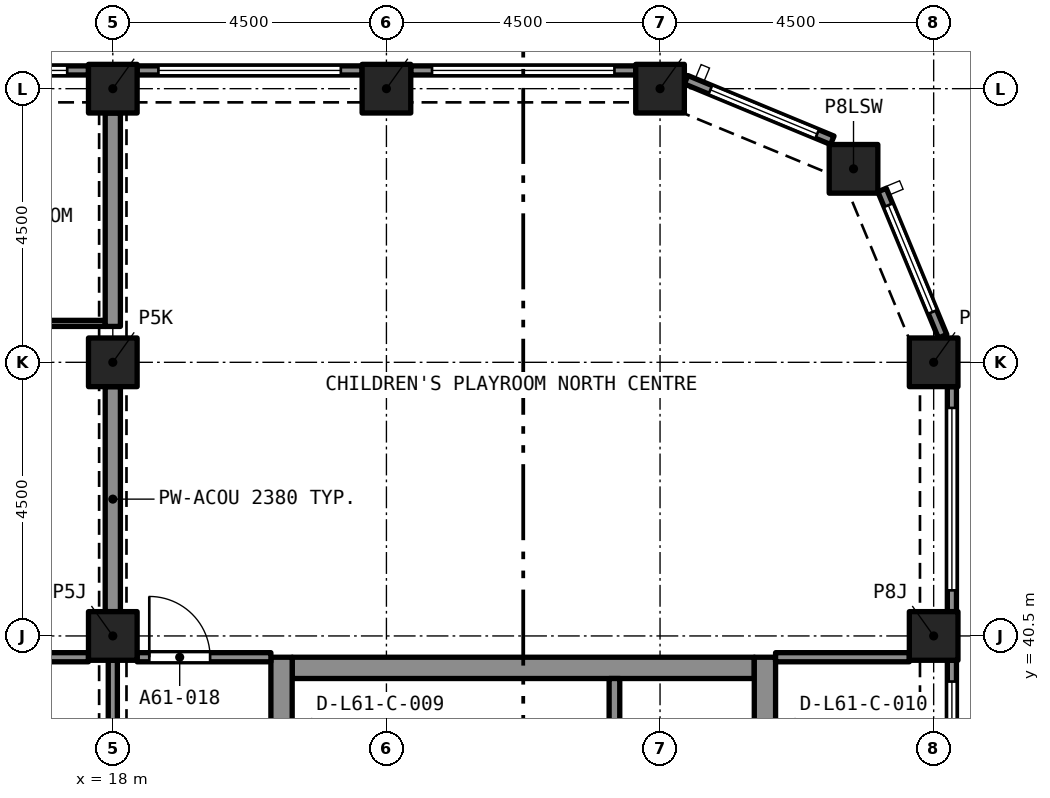
"""IFC4 building model, lengths in metres.
Left out: names, types, materials, properties, quantities, classifications, styles, units other than length and angle.
Written with IfcOpenShell. Run it as: python <this file> out.ifc"""

import sys

from ifc_helpers import new_model, si_unit, direction, frame, frame_2d, origin, origin_2d, place, context, subcontext, project, spatial, rectangle, extrude, element, fill, save


model = new_model("IFC4")
c1 = context("Model", 3, precision=1e-05, world=origin(), true_north=direction((0.0, 1.0)))
c2 = subcontext(c1, "Body", "Model", "MODEL_VIEW")
j1 = project(units=[si_unit("LENGTHUNIT", "METRE"), si_unit("PLANEANGLEUNIT", "RADIAN")], contexts=[c1])
p1 = place(None, origin())
s1 = spatial("IfcSite", under=j1, at=p1, CompositionType="ELEMENT")
p2 = place(p1, origin())
s2 = spatial("IfcBuilding", under=s1, at=p2, CompositionType="ELEMENT")
p3 = place(p2, frame((0.0, 0.0, 219.695)))
s3 = spatial("IfcBuildingStorey", under=s2, at=p3, CompositionType="ELEMENT", Elevation=219.695)
for number, where, z_axis, x_axis in (
    (1, (18.0, 40.5, 0.0), (0.0, 0.0, 1.0), (1.0, 0.0, 0.0)),
    (2, (31.5, 40.5, 0.0), (0.0, 0.0, 1.0), (1.0, 0.0, 0.0)),
    (3, (18.0, 45.0, 0.0), (0.0, 0.0, 1.0), (1.0, 0.0, 0.0)),
    (4, (31.5, 45.0, 0.0), (0.0, 0.0, 1.0), (1.0, 0.0, 0.0)),
    (5, (30.182, 48.182, 0.0), (0.0, 0.0, 1.0), (1.0, 0.0, 0.0)),
    (6, (18.0, 49.5, 0.0), (0.0, 0.0, 1.0), (1.0, 0.0, 0.0)),
    (7, (22.5, 49.5, 0.0), (0.0, 0.0, 1.0), (1.0, 0.0, 0.0)),
    (8, (27.0, 49.5, 0.0), (0.0, 0.0, 1.0), (1.0, 0.0, 0.0)),
):
    element("IfcColumn", number, at=place(p3, frame(where, z_axis=z_axis, x_axis=x_axis)), inside=s3, PredefinedType="COLUMN", context=c2, shape_type="SweptSolid", body=[
        extrude(rectangle(XDim=0.8, YDim=0.8, at=origin_2d()), origin(), (0.0, 0.0, 1.0), 3.2),
    ])
p4 = place(p3, frame((20.95, 39.975, 0.0), z_axis=(0.0, 0.0, 1.0), x_axis=(1.0, 0.0, 0.0)))
e9 = element("IfcWall", 9, at=p4, inside=s3, PredefinedType="SOLIDWALL", context=c2, shape_type="SweptSolid", body=[
    extrude(rectangle(XDim=7.6, YDim=0.35, at=frame_2d((3.8, 0.0))), origin(), (0.0, 0.0, 1.0), 3.2),
])
p5 = place(p3, frame((20.775, 27.35, 0.0), z_axis=(0.0, 0.0, 1.0), x_axis=(0.0, 1.0, 0.0)))
e10 = element("IfcWall", 10, at=p5, inside=s3, PredefinedType="SOLIDWALL", context=c2, shape_type="SweptSolid", body=[
    extrude(rectangle(XDim=12.8, YDim=0.35, at=frame_2d((6.4, 0.0))), origin(), (0.0, 0.0, 1.0), 3.2),
])
p6 = place(p5, frame((8.6, 0.0, 0.0)))
e11 = element("IfcOpeningElement", 11, at=p6, cuts=e10, PredefinedType="OPENING", context=c2, shape_type="SweptSolid", body=[
    extrude(rectangle(XDim=1.2, YDim=2.1, at=frame_2d((0.6, 1.05))), frame((0.0, 0.185, 0.0), z_axis=(0.0, -1.0, 0.0), x_axis=(1.0, 0.0, 0.0)), (0.0, 0.0, 1.0), 0.37),
])
p7 = place(p3, frame((28.725, 27.35, 0.0), z_axis=(0.0, 0.0, 1.0), x_axis=(0.0, 1.0, 0.0)))
e12 = element("IfcWall", 12, at=p7, inside=s3, PredefinedType="SOLIDWALL", context=c2, shape_type="SweptSolid", body=[
    extrude(rectangle(XDim=12.8, YDim=0.35, at=frame_2d((6.4, 0.0))), origin(), (0.0, 0.0, 1.0), 3.2),
])
p8 = place(p7, frame((8.6, 0.0, 0.0)))
e13 = element("IfcOpeningElement", 13, at=p8, cuts=e12, PredefinedType="OPENING", context=c2, shape_type="SweptSolid", body=[
    extrude(rectangle(XDim=1.2, YDim=2.1, at=frame_2d((0.6, 1.05))), frame((0.0, 0.185, 0.0), z_axis=(0.0, -1.0, 0.0), x_axis=(1.0, 0.0, 0.0)), (0.0, 0.0, 1.0), 0.37),
])
p9 = place(p3, frame((31.8, 40.1, 0.0), z_axis=(0.0, 0.0, 1.0), x_axis=(0.0, -1.0, 0.0)))
e14 = element("IfcWall", 14, at=p9, inside=s3, PredefinedType="SOLIDWALL", context=c2, shape_type="SweptSolid", body=[
    extrude(rectangle(XDim=3.7, YDim=0.15, at=frame_2d((1.85, 0.0))), origin(), (0.0, 0.0, 1.0), 3.2),
])
p10 = place(p9, frame((0.35, 0.0, 0.45)))
e15 = element("IfcOpeningElement", 15, at=p10, cuts=e14, PredefinedType="OPENING", context=c2, shape_type="SweptSolid", body=[
    extrude(rectangle(XDim=3.0, YDim=1.95, at=frame_2d((1.5, 0.975))), frame((0.0, 0.085, 0.0), z_axis=(0.0, -1.0, 0.0), x_axis=(1.0, 0.0, 0.0)), (0.0, 0.0, 1.0), 0.17),
])
p11 = place(p3, frame((31.8, 44.6, 0.0), z_axis=(0.0, 0.0, 1.0), x_axis=(0.0, -1.0, 0.0)))
e16 = element("IfcWall", 16, at=p11, inside=s3, PredefinedType="SOLIDWALL", context=c2, shape_type="SweptSolid", body=[
    extrude(rectangle(XDim=3.7, YDim=0.15, at=frame_2d((1.85, 0.0))), origin(), (0.0, 0.0, 1.0), 3.2),
])
p12 = place(p11, frame((0.35, 0.0, 0.45)))
e17 = element("IfcOpeningElement", 17, at=p12, cuts=e16, PredefinedType="OPENING", context=c2, shape_type="SweptSolid", body=[
    extrude(rectangle(XDim=3.0, YDim=1.95, at=frame_2d((1.5, 0.975))), frame((0.0, 0.085, 0.0), z_axis=(0.0, -1.0, 0.0), x_axis=(1.0, 0.0, 0.0)), (0.0, 0.0, 1.0), 0.17),
])
p13 = place(p3, frame((30.651, 47.833, 0.0), z_axis=(0.0, 0.0, 1.0), x_axis=(0.382669406082, -0.923885342263, 0.0)))
e18 = element("IfcWall", 18, at=p13, inside=s3, PredefinedType="SOLIDWALL", context=c2, shape_type="SweptSolid", body=[
    extrude(rectangle(XDim=2.602, YDim=0.15, at=frame_2d((1.301, 0.0))), origin(), (0.0, 0.0, 1.0), 3.2),
])
p14 = place(p13, frame((0.27, 0.0, 0.45)))
e19 = element("IfcOpeningElement", 19, at=p14, cuts=e18, PredefinedType="OPENING", context=c2, shape_type="SweptSolid", body=[
    extrude(rectangle(XDim=1.9, YDim=1.95, at=frame_2d((0.95, 0.975))), frame((0.0, 0.085, 0.0), z_axis=(0.0, -1.0, 0.0), x_axis=(1.0, 0.0, 0.0)), (0.0, 0.0, 1.0), 0.17),
])
p15 = place(p3, frame((27.429, 49.647, 0.0), z_axis=(0.0, 0.0, 1.0), x_axis=(0.923885342263, -0.382669406082, 0.0)))
e20 = element("IfcWall", 20, at=p15, inside=s3, PredefinedType="SOLIDWALL", context=c2, shape_type="SweptSolid", body=[
    extrude(rectangle(XDim=2.602, YDim=0.15, at=frame_2d((1.301, 0.0))), origin(), (0.0, 0.0, 1.0), 3.2),
])
p16 = place(p15, frame((0.432, 0.0, 0.45)))
e21 = element("IfcOpeningElement", 21, at=p16, cuts=e20, PredefinedType="OPENING", context=c2, shape_type="SweptSolid", body=[
    extrude(rectangle(XDim=1.9, YDim=1.95, at=frame_2d((0.95, 0.975))), frame((0.0, 0.085, 0.0), z_axis=(0.0, -1.0, 0.0), x_axis=(1.0, 0.0, 0.0)), (0.0, 0.0, 1.0), 0.17),
])
p17 = place(p3, frame((22.9, 49.8, 0.0), z_axis=(0.0, 0.0, 1.0), x_axis=(1.0, 0.0, 0.0)))
e22 = element("IfcWall", 22, at=p17, inside=s3, PredefinedType="SOLIDWALL", context=c2, shape_type="SweptSolid", body=[
    extrude(rectangle(XDim=3.7, YDim=0.15, at=frame_2d((1.85, 0.0))), origin(), (0.0, 0.0, 1.0), 3.2),
])
p18 = place(p17, frame((0.35, 0.0, 0.45)))
e23 = element("IfcOpeningElement", 23, at=p18, cuts=e22, PredefinedType="OPENING", context=c2, shape_type="SweptSolid", body=[
    extrude(rectangle(XDim=3.0, YDim=1.95, at=frame_2d((1.5, 0.975))), frame((0.0, 0.085, 0.0), z_axis=(0.0, -1.0, 0.0), x_axis=(1.0, 0.0, 0.0)), (0.0, 0.0, 1.0), 0.17),
])
p19 = place(p3, frame((18.4, 49.8, 0.0), z_axis=(0.0, 0.0, 1.0), x_axis=(1.0, 0.0, 0.0)))
e24 = element("IfcWall", 24, at=p19, inside=s3, PredefinedType="SOLIDWALL", context=c2, shape_type="SweptSolid", body=[
    extrude(rectangle(XDim=3.7, YDim=0.15, at=frame_2d((1.85, 0.0))), origin(), (0.0, 0.0, 1.0), 3.2),
])
p20 = place(p19, frame((0.35, 0.0, 0.45)))
e25 = element("IfcOpeningElement", 25, at=p20, cuts=e24, PredefinedType="OPENING", context=c2, shape_type="SweptSolid", body=[
    extrude(rectangle(XDim=3.0, YDim=1.95, at=frame_2d((1.5, 0.975))), frame((0.0, 0.085, 0.0), z_axis=(0.0, -1.0, 0.0), x_axis=(1.0, 0.0, 0.0)), (0.0, 0.0, 1.0), 0.17),
])
p21 = place(p3, frame((13.9, 49.8, 0.0), z_axis=(0.0, 0.0, 1.0), x_axis=(1.0, 0.0, 0.0)))
e26 = element("IfcWall", 26, at=p21, inside=s3, PredefinedType="SOLIDWALL", context=c2, shape_type="SweptSolid", body=[
    extrude(rectangle(XDim=3.7, YDim=0.15, at=frame_2d((1.85, 0.0))), origin(), (0.0, 0.0, 1.0), 3.2),
])
p22 = place(p21, frame((0.35, 0.0, 0.45)))
e27 = element("IfcOpeningElement", 27, at=p22, cuts=e26, PredefinedType="OPENING", context=c2, shape_type="SweptSolid", body=[
    extrude(rectangle(XDim=3.0, YDim=1.95, at=frame_2d((1.5, 0.975))), frame((0.0, 0.085, 0.0), z_axis=(0.0, -1.0, 0.0), x_axis=(1.0, 0.0, 0.0)), (0.0, 0.0, 1.0), 0.17),
])
p23 = place(p3, frame((13.5, 45.64, 0.0), z_axis=(0.0, 0.0, 1.0), x_axis=(1.0, 0.0, 0.0)))
e28 = element("IfcWall", 28, at=p23, inside=s3, PredefinedType="PARTITIONING", context=c2, shape_type="SweptSolid", body=[
    extrude(rectangle(XDim=4.375, YDim=0.1, at=frame_2d((2.188, 0.0))), origin(), (0.0, 0.0, 1.0), 2.9),
])
p24 = place(p23, frame((1.8, 0.0, 0.0)))
e29 = element("IfcOpeningElement", 29, at=p24, cuts=e28, PredefinedType="OPENING", context=c2, shape_type="SweptSolid", body=[
    extrude(rectangle(XDim=0.9, YDim=2.1, at=frame_2d((0.45, 1.05))), frame((0.0, 0.06, 0.0), z_axis=(0.0, -1.0, 0.0), x_axis=(1.0, 0.0, 0.0)), (0.0, 0.0, 1.0), 0.12),
])
p25 = place(p3, frame((18.0, 45.59, 0.0), z_axis=(0.0, 0.0, 1.0), x_axis=(0.0, 1.0, 0.0)))
e30 = element("IfcWall", 30, at=p25, inside=s3, PredefinedType="PARTITIONING", context=c2, shape_type="SweptSolid", body=[
    extrude(rectangle(XDim=3.51, YDim=0.25, at=frame_2d((1.755, 0.0))), origin(), (0.0, 0.0, 1.0), 2.38),
])
p26 = place(p3, frame((18.0, 40.9, 0.0), z_axis=(0.0, 0.0, 1.0), x_axis=(0.0, 1.0, 0.0)))
e31 = element("IfcWall", 31, at=p26, inside=s3, PredefinedType="PARTITIONING", context=c2, shape_type="SweptSolid", body=[
    extrude(rectangle(XDim=3.7, YDim=0.25, at=frame_2d((1.85, 0.0))), origin(), (0.0, 0.0, 1.0), 2.38),
])
p27 = place(p3, frame((14.95, 40.15, 0.0), z_axis=(0.0, 0.0, 1.0), x_axis=(1.0, 0.0, 0.0)))
e32 = element("IfcWall", 32, at=p27, inside=s3, PredefinedType="PARTITIONING", context=c2, shape_type="SweptSolid", body=[
    extrude(rectangle(XDim=2.65, YDim=0.15, at=frame_2d((1.325, 0.0))), origin(), (0.0, 0.0, 1.0), 2.9),
])
p28 = place(p27, frame((0.2, 0.0, 0.0)))
e33 = element("IfcOpeningElement", 33, at=p28, cuts=e32, PredefinedType="OPENING", context=c2, shape_type="SweptSolid", body=[
    extrude(rectangle(XDim=1.2, YDim=2.4, at=frame_2d((0.6, 1.2))), frame((0.0, 0.085, 0.0), z_axis=(0.0, -1.0, 0.0), x_axis=(1.0, 0.0, 0.0)), (0.0, 0.0, 1.0), 0.17),
])
p29 = place(p3, frame((18.4, 40.15, 0.0), z_axis=(0.0, 0.0, 1.0), x_axis=(1.0, 0.0, 0.0)))
e34 = element("IfcWall", 34, at=p29, inside=s3, PredefinedType="PARTITIONING", context=c2, shape_type="SweptSolid", body=[
    extrude(rectangle(XDim=2.2, YDim=0.15, at=frame_2d((1.1, 0.0))), origin(), (0.0, 0.0, 1.0), 2.75),
])
p30 = place(p29, frame((0.2, 0.0, 0.0)))
e35 = element("IfcOpeningElement", 35, at=p30, cuts=e34, PredefinedType="OPENING", context=c2, shape_type="SweptSolid", body=[
    extrude(rectangle(XDim=1.0, YDim=2.1, at=frame_2d((0.5, 1.05))), frame((0.0, 0.085, 0.0), z_axis=(0.0, -1.0, 0.0), x_axis=(1.0, 0.0, 0.0)), (0.0, 0.0, 1.0), 0.17),
])
p31 = place(p3, frame((28.9, 40.15, 0.0), z_axis=(0.0, 0.0, 1.0), x_axis=(1.0, 0.0, 0.0)))
e36 = element("IfcWall", 36, at=p31, inside=s3, PredefinedType="PARTITIONING", context=c2, shape_type="SweptSolid", body=[
    extrude(rectangle(XDim=2.2, YDim=0.15, at=frame_2d((1.1, 0.0))), origin(), (0.0, 0.0, 1.0), 2.75),
])
p32 = place(p3, frame((18.0, 40.1, 0.0), z_axis=(0.0, 0.0, 1.0), x_axis=(0.0, -1.0, 0.0)))
e37 = element("IfcWall", 37, at=p32, inside=s3, PredefinedType="PARTITIONING", context=c2, shape_type="SweptSolid", body=[
    extrude(rectangle(XDim=3.7, YDim=0.15, at=frame_2d((1.85, 0.0))), origin(), (0.0, 0.0, 1.0), 2.38),
])
p33 = place(p32, frame((1.25, 0.0, 0.0)))
e38 = element("IfcOpeningElement", 38, at=p33, cuts=e37, PredefinedType="OPENING", context=c2, shape_type="SweptSolid", body=[
    extrude(rectangle(XDim=1.2, YDim=2.1, at=frame_2d((0.6, 1.05))), frame((0.0, 0.085, 0.0), z_axis=(0.0, -1.0, 0.0), x_axis=(1.0, 0.0, 0.0)), (0.0, 0.0, 1.0), 0.17),
])
p34 = place(p3, frame((26.25, 37.5, 0.0), z_axis=(0.0, 0.0, 1.0), x_axis=(0.0, 1.0, 0.0)))
e39 = element("IfcWall", 39, at=p34, inside=s3, PredefinedType="SOLIDWALL", context=c2, shape_type="SweptSolid", body=[
    extrude(rectangle(XDim=2.3, YDim=0.175, at=frame_2d((1.15, 0.0))), origin(), (0.0, 0.0, 1.0), 2.9),
])
p35 = place(p10, origin())
e40 = element("IfcWindow", 40, at=p35, inside=s3, PartitioningType="SINGLE_PANEL", PredefinedType="WINDOW", context=c2, shape_type="SweptSolid", body=[
    extrude(rectangle(XDim=3.0, YDim=1.95, at=frame_2d((1.5, 0.975))), frame((0.0, 0.03, 0.0), z_axis=(0.0, -1.0, 0.0), x_axis=(1.0, 0.0, 0.0)), (0.0, 0.0, 1.0), 0.06),
])
fill(e15, e40)
p36 = place(p12, origin())
e41 = element("IfcWindow", 41, at=p36, inside=s3, PartitioningType="SINGLE_PANEL", PredefinedType="WINDOW", context=c2, shape_type="SweptSolid", body=[
    extrude(rectangle(XDim=3.0, YDim=1.95, at=frame_2d((1.5, 0.975))), frame((0.0, 0.03, 0.0), z_axis=(0.0, -1.0, 0.0), x_axis=(1.0, 0.0, 0.0)), (0.0, 0.0, 1.0), 0.06),
])
fill(e17, e41)
p37 = place(p14, origin())
e42 = element("IfcWindow", 42, at=p37, inside=s3, PartitioningType="SINGLE_PANEL", PredefinedType="WINDOW", context=c2, shape_type="SweptSolid", body=[
    extrude(rectangle(XDim=1.9, YDim=1.95, at=frame_2d((0.95, 0.975))), frame((0.0, 0.03, 0.0), z_axis=(0.0, -1.0, 0.0), x_axis=(1.0, 0.0, 0.0)), (0.0, 0.0, 1.0), 0.06),
])
fill(e19, e42)
p38 = place(p16, origin())
e43 = element("IfcWindow", 43, at=p38, inside=s3, PartitioningType="SINGLE_PANEL", PredefinedType="WINDOW", context=c2, shape_type="SweptSolid", body=[
    extrude(rectangle(XDim=1.9, YDim=1.95, at=frame_2d((0.95, 0.975))), frame((0.0, 0.03, 0.0), z_axis=(0.0, -1.0, 0.0), x_axis=(1.0, 0.0, 0.0)), (0.0, 0.0, 1.0), 0.06),
])
fill(e21, e43)
p39 = place(p18, origin())
e44 = element("IfcWindow", 44, at=p39, inside=s3, PartitioningType="SINGLE_PANEL", PredefinedType="WINDOW", context=c2, shape_type="SweptSolid", body=[
    extrude(rectangle(XDim=3.0, YDim=1.95, at=frame_2d((1.5, 0.975))), frame((0.0, 0.03, 0.0), z_axis=(0.0, -1.0, 0.0), x_axis=(1.0, 0.0, 0.0)), (0.0, 0.0, 1.0), 0.06),
])
fill(e23, e44)
p40 = place(p20, origin())
e45 = element("IfcWindow", 45, at=p40, inside=s3, PartitioningType="SINGLE_PANEL", PredefinedType="WINDOW", context=c2, shape_type="SweptSolid", body=[
    extrude(rectangle(XDim=3.0, YDim=1.95, at=frame_2d((1.5, 0.975))), frame((0.0, 0.03, 0.0), z_axis=(0.0, -1.0, 0.0), x_axis=(1.0, 0.0, 0.0)), (0.0, 0.0, 1.0), 0.06),
])
fill(e25, e45)
p41 = place(p22, origin())
e46 = element("IfcWindow", 46, at=p41, inside=s3, PartitioningType="SINGLE_PANEL", PredefinedType="WINDOW", context=c2, shape_type="SweptSolid", body=[
    extrude(rectangle(XDim=3.0, YDim=1.95, at=frame_2d((1.5, 0.975))), frame((0.0, 0.03, 0.0), z_axis=(0.0, -1.0, 0.0), x_axis=(1.0, 0.0, 0.0)), (0.0, 0.0, 1.0), 0.06),
])
fill(e27, e46)
p42 = place(p30, origin())
e47 = element("IfcDoor", 47, at=p42, inside=s3, OperationType="SINGLE_SWING_LEFT", PredefinedType="DOOR", context=c2, shape_type="SweptSolid", body=[
    extrude(rectangle(XDim=1.0, YDim=2.1, at=frame_2d((0.5, 1.05))), frame((0.0, 0.025, 0.0), z_axis=(0.0, -1.0, 0.0), x_axis=(1.0, 0.0, 0.0)), (0.0, 0.0, 1.0), 0.05),
])
fill(e35, e47)
save(model, sys.argv[1])
